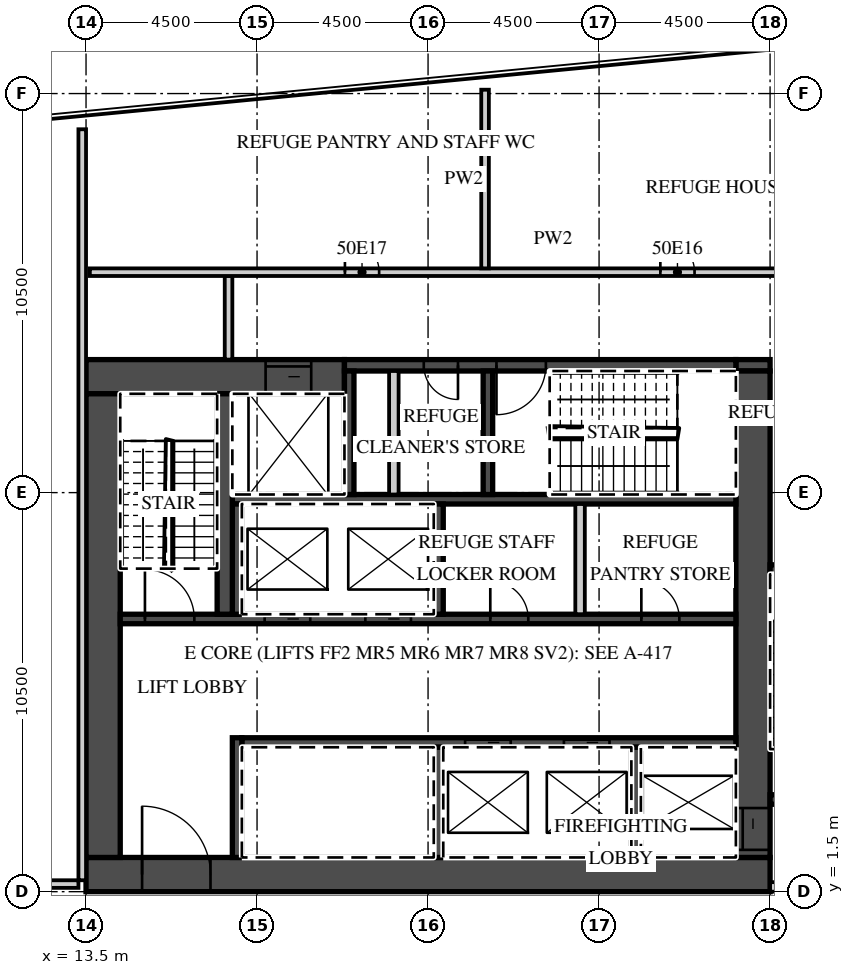
"""IFC4 building model, lengths in metres.
Left out: names, types, materials, properties, quantities, classifications, styles, units other than length and angle.
Written with IfcOpenShell. Run it as: python <this file> out.ifc"""

import sys

from ifc_helpers import new_model, si_unit, direction, frame, frame_2d, origin, place, context, subcontext, project, spatial, rectangle, extrude, element, fill, save


model = new_model("IFC4")
c1 = context("Model", 3, precision=1e-05, world=origin(), true_north=direction((0.0, 1.0)))
c2 = subcontext(c1, "Body", "Model", "MODEL_VIEW")
j1 = project(units=[si_unit("LENGTHUNIT", "METRE"), si_unit("PLANEANGLEUNIT", "RADIAN")], contexts=[c1])
p1 = place(None, origin())
s1 = spatial("IfcSite", under=j1, at=p1, CompositionType="ELEMENT")
p2 = place(p1, origin())
s2 = spatial("IfcBuilding", under=s1, at=p2, CompositionType="ELEMENT")
p3 = place(p2, frame((0.0, 0.0, 206.5)))
s3 = spatial("IfcBuildingStorey", under=s2, at=p3, CompositionType="ELEMENT", Elevation=206.5)
p4 = place(p3, frame((13.5, 1.95, 0.0), z_axis=(0.0, 0.0, 1.0), x_axis=(1.0, 0.0, 0.0)))
e1 = element("IfcWall", 1, at=p4, inside=s3, PredefinedType="SHEAR", context=c2, shape_type="SweptSolid", body=[
    extrude(rectangle(XDim=18.0, YDim=0.9, at=frame_2d((9.0, 0.0))), origin(), (0.0, 0.0, 1.0), 4.2),
])
p5 = place(p4, frame((1.475, 0.0, 0.0)))
e2 = element("IfcOpeningElement", 2, at=p5, cuts=e1, PredefinedType="OPENING", context=c2, shape_type="SweptSolid", body=[
    extrude(rectangle(XDim=1.8, YDim=2.1, at=frame_2d((0.9, 1.05))), frame((0.0, 0.46, 0.0), z_axis=(0.0, -1.0, 0.0), x_axis=(1.0, 0.0, 0.0)), (0.0, 0.0, 1.0), 0.92),
])
p6 = place(p3, frame((13.5, 15.05, 0.0), z_axis=(0.0, 0.0, 1.0), x_axis=(1.0, 0.0, 0.0)))
e3 = element("IfcWall", 3, at=p6, inside=s3, PredefinedType="SHEAR", context=c2, shape_type="SweptSolid", body=[
    extrude(rectangle(XDim=6.8, YDim=0.9, at=frame_2d((3.4, 0.0))), origin(), (0.0, 0.0, 1.0), 4.2),
])
p7 = place(p6, frame((4.725, 0.0, 0.0)))
e4 = element("IfcOpeningElement", 4, at=p7, cuts=e3, PredefinedType="OPENING", context=c2, shape_type="SweptSolid", body=[
    extrude(rectangle(XDim=1.2, YDim=2.1, at=frame_2d((0.6, 1.05))), frame((0.0, 0.46, 0.0), z_axis=(0.0, -1.0, 0.0), x_axis=(1.0, 0.0, 0.0)), (0.0, 0.0, 1.0), 0.92),
])
p8 = place(p3, frame((30.6, 15.35, 0.0), z_axis=(0.0, 0.0, 1.0), x_axis=(1.0, 0.0, 0.0)))
e5 = element("IfcWall", 5, at=p8, inside=s3, PredefinedType="SHEAR", context=c2, shape_type="SweptSolid", body=[
    extrude(rectangle(XDim=0.9, YDim=0.3, at=frame_2d((0.45, 0.0))), origin(), (0.0, 0.0, 1.0), 4.2),
])
p9 = place(p3, frame((20.3, 15.35, 0.0), z_axis=(0.0, 0.0, 1.0), x_axis=(1.0, 0.0, 0.0)))
e6 = element("IfcWall", 6, at=p9, inside=s3, PredefinedType="SHEAR", context=c2, shape_type="SweptSolid", body=[
    extrude(rectangle(XDim=10.3, YDim=0.3, at=frame_2d((5.15, 0.0))), origin(), (0.0, 0.0, 1.0), 4.2),
])
p10 = place(p9, frame((4.0, 0.0, 0.0)))
e7 = element("IfcOpeningElement", 7, at=p10, cuts=e6, PredefinedType="OPENING", context=c2, shape_type="SweptSolid", body=[
    extrude(rectangle(XDim=1.3, YDim=2.1, at=frame_2d((0.65, 1.05))), frame((0.0, 0.16, 0.0), z_axis=(0.0, -1.0, 0.0), x_axis=(1.0, 0.0, 0.0)), (0.0, 0.0, 1.0), 0.32),
])
p11 = place(p9, frame((2.087, 0.0, 0.0)))
e8 = element("IfcOpeningElement", 8, at=p11, cuts=e6, PredefinedType="OPENING", context=c2, shape_type="SweptSolid", body=[
    extrude(rectangle(XDim=0.9, YDim=2.1, at=frame_2d((0.45, 1.05))), frame((0.0, 0.16, 0.0), z_axis=(0.0, -1.0, 0.0), x_axis=(1.0, 0.0, 0.0)), (0.0, 0.0, 1.0), 0.32),
])
p12 = place(p3, frame((31.05, 2.4, 0.0), z_axis=(0.0, 0.0, 1.0), x_axis=(0.0, 1.0, 0.0)))
e9 = element("IfcWall", 9, at=p12, inside=s3, PredefinedType="SHEAR", context=c2, shape_type="SweptSolid", body=[
    extrude(rectangle(XDim=12.8, YDim=0.9, at=frame_2d((6.4, 0.0))), origin(), (0.0, 0.0, 1.0), 4.2),
])
p13 = place(p12, frame((0.2, 0.0, 0.0)))
e10 = element("IfcOpeningElement", 10, at=p13, cuts=e9, PredefinedType="OPENING", context=c2, shape_type="SweptSolid", body=[
    extrude(rectangle(XDim=1.1, YDim=2.1, at=frame_2d((0.55, 1.05))), frame((0.0, 0.46, 0.0), z_axis=(0.0, -1.0, 0.0), x_axis=(1.0, 0.0, 0.0)), (0.0, 0.0, 1.0), 0.92),
])
p14 = place(p3, frame((13.95, 2.4, 0.0), z_axis=(0.0, 0.0, 1.0), x_axis=(0.0, 1.0, 0.0)))
e11 = element("IfcWall", 11, at=p14, inside=s3, PredefinedType="SHEAR", context=c2, shape_type="SweptSolid", body=[
    extrude(rectangle(XDim=12.2, YDim=0.9, at=frame_2d((6.1, 0.0))), origin(), (0.0, 0.0, 1.0), 4.2),
])
p15 = place(p3, frame((17.6, 5.425, 0.0), z_axis=(0.0, 0.0, 1.0), x_axis=(1.0, 0.0, 0.0)))
e12 = element("IfcWall", 12, at=p15, inside=s3, PredefinedType="SHEAR", context=c2, shape_type="SweptSolid", body=[
    extrude(rectangle(XDim=13.0, YDim=0.25, at=frame_2d((6.5, 0.0))), origin(), (0.0, 0.0, 1.0), 4.2),
])
p16 = place(p15, frame((8.475, 0.0, 0.0)))
e13 = element("IfcOpeningElement", 13, at=p16, cuts=e12, PredefinedType="OPENING", context=c2, shape_type="SweptSolid", body=[
    extrude(rectangle(XDim=1.2, YDim=2.1, at=frame_2d((0.6, 1.05))), frame((0.0, 0.135, 0.0), z_axis=(0.0, -1.0, 0.0), x_axis=(1.0, 0.0, 0.0)), (0.0, 0.0, 1.0), 0.27),
])
p17 = place(p15, frame((5.875, 0.0, 0.0)))
e14 = element("IfcOpeningElement", 14, at=p17, cuts=e12, PredefinedType="OPENING", context=c2, shape_type="SweptSolid", body=[
    extrude(rectangle(XDim=1.2, YDim=2.1, at=frame_2d((0.6, 1.05))), frame((0.0, 0.135, 0.0), z_axis=(0.0, -1.0, 0.0), x_axis=(1.0, 0.0, 0.0)), (0.0, 0.0, 1.0), 0.27),
])
p18 = place(p3, frame((17.475, 2.4, 0.0), z_axis=(0.0, 0.0, 1.0), x_axis=(0.0, 1.0, 0.0)))
e15 = element("IfcWall", 15, at=p18, inside=s3, PredefinedType="SHEAR", context=c2, shape_type="SweptSolid", body=[
    extrude(rectangle(XDim=3.15, YDim=0.25, at=frame_2d((1.575, 0.0))), origin(), (0.0, 0.0, 1.0), 4.2),
])
for number, where, z_axis, x_axis in (
    (16, (27.975, 2.4, 0.0), (0.0, 0.0, 1.0), (0.0, 1.0, 0.0)),
    (17, (22.775, 2.4, 0.0), (0.0, 0.0, 1.0), (0.0, 1.0, 0.0)),
):
    element("IfcWall", number, at=place(p3, frame(where, z_axis=z_axis, x_axis=x_axis)), inside=s3, PredefinedType="SHEAR", context=c2, shape_type="SweptSolid", body=[
        extrude(rectangle(XDim=2.9, YDim=0.25, at=frame_2d((1.45, 0.0))), origin(), (0.0, 0.0, 1.0), 4.2),
    ])
p19 = place(p3, frame((14.4, 8.675, 0.0), z_axis=(0.0, 0.0, 1.0), x_axis=(1.0, 0.0, 0.0)))
e18 = element("IfcWall", 18, at=p19, inside=s3, PredefinedType="SHEAR", context=c2, shape_type="SweptSolid", body=[
    extrude(rectangle(XDim=16.2, YDim=0.25, at=frame_2d((8.1, 0.0))), origin(), (0.0, 0.0, 1.0), 4.2),
])
p20 = place(p19, frame((6.45, 0.0, 0.0)))
e19 = element("IfcOpeningElement", 19, at=p20, cuts=e18, PredefinedType="OPENING", context=c2, shape_type="SweptSolid", body=[
    extrude(rectangle(XDim=1.2, YDim=2.1, at=frame_2d((0.6, 1.05))), frame((0.0, 0.135, 0.0), z_axis=(0.0, -1.0, 0.0), x_axis=(1.0, 0.0, 0.0)), (0.0, 0.0, 1.0), 0.27),
])
p21 = place(p19, frame((3.8, 0.0, 0.0)))
e20 = element("IfcOpeningElement", 20, at=p21, cuts=e18, PredefinedType="OPENING", context=c2, shape_type="SweptSolid", body=[
    extrude(rectangle(XDim=1.2, YDim=2.1, at=frame_2d((0.6, 1.05))), frame((0.0, 0.135, 0.0), z_axis=(0.0, -1.0, 0.0), x_axis=(1.0, 0.0, 0.0)), (0.0, 0.0, 1.0), 0.27),
])
p22 = place(p19, frame((0.65, 0.0, 0.0)))
e21 = element("IfcOpeningElement", 21, at=p22, cuts=e18, PredefinedType="OPENING", context=c2, shape_type="SweptSolid", body=[
    extrude(rectangle(XDim=1.3, YDim=2.1, at=frame_2d((0.65, 1.05))), frame((0.0, 0.135, 0.0), z_axis=(0.0, -1.0, 0.0), x_axis=(1.0, 0.0, 0.0)), (0.0, 0.0, 1.0), 0.27),
])
p23 = place(p19, frame((13.712, 0.0, 0.0)))
e22 = element("IfcOpeningElement", 22, at=p23, cuts=e18, PredefinedType="OPENING", context=c2, shape_type="SweptSolid", body=[
    extrude(rectangle(XDim=1.0, YDim=2.1, at=frame_2d((0.5, 1.05))), frame((0.0, 0.135, 0.0), z_axis=(0.0, -1.0, 0.0), x_axis=(1.0, 0.0, 0.0)), (0.0, 0.0, 1.0), 0.27),
])
p24 = place(p19, frame((9.738, 0.0, 0.0)))
e23 = element("IfcOpeningElement", 23, at=p24, cuts=e18, PredefinedType="OPENING", context=c2, shape_type="SweptSolid", body=[
    extrude(rectangle(XDim=1.0, YDim=2.1, at=frame_2d((0.5, 1.05))), frame((0.0, 0.135, 0.0), z_axis=(0.0, -1.0, 0.0), x_axis=(1.0, 0.0, 0.0)), (0.0, 0.0, 1.0), 0.27),
])
p25 = place(p3, frame((17.35, 11.825, 0.0), z_axis=(0.0, 0.0, 1.0), x_axis=(1.0, 0.0, 0.0)))
e24 = element("IfcWall", 24, at=p25, inside=s3, PredefinedType="SHEAR", context=c2, shape_type="SweptSolid", body=[
    extrude(rectangle(XDim=13.25, YDim=0.25, at=frame_2d((6.625, 0.0))), origin(), (0.0, 0.0, 1.0), 4.2),
])
for number, where, z_axis, x_axis in (
    (25, (17.475, 8.8, 0.0), (0.0, 0.0, 1.0), (0.0, 1.0, 0.0)),
    (26, (22.775, 8.8, 0.0), (0.0, 0.0, 1.0), (0.0, 1.0, 0.0)),
):
    element("IfcWall", number, at=place(p3, frame(where, z_axis=z_axis, x_axis=x_axis)), inside=s3, PredefinedType="SHEAR", context=c2, shape_type="SweptSolid", body=[
        extrude(rectangle(XDim=2.9, YDim=0.25, at=frame_2d((1.45, 0.0))), origin(), (0.0, 0.0, 1.0), 4.2),
    ])
p26 = place(p3, frame((26.5, 8.8, 0.0), z_axis=(0.0, 0.0, 1.0), x_axis=(0.0, 1.0, 0.0)))
e27 = element("IfcWall", 27, at=p26, inside=s3, PredefinedType="PARTITIONING", context=c2, shape_type="SweptSolid", body=[
    extrude(rectangle(XDim=2.9, YDim=0.25, at=frame_2d((1.45, 0.0))), origin(), (0.0, 0.0, 1.0), 4.2),
])
p27 = place(p3, frame((17.15, 8.8, 0.0), z_axis=(0.0, 0.0, 1.0), x_axis=(0.0, 1.0, 0.0)))
e28 = element("IfcWall", 28, at=p27, inside=s3, PredefinedType="SHEAR", context=c2, shape_type="SweptSolid", body=[
    extrude(rectangle(XDim=5.8, YDim=0.4, at=frame_2d((2.9, 0.0))), origin(), (0.0, 0.0, 1.0), 4.2),
])
for number, where, z_axis, x_axis in (
    (29, (20.425, 11.95, 0.0), (0.0, 0.0, 1.0), (0.0, 1.0, 0.0)),
    (30, (24.075, 11.95, 0.0), (0.0, 0.0, 1.0), (0.0, 1.0, 0.0)),
):
    element("IfcWall", number, at=place(p3, frame(where, z_axis=z_axis, x_axis=x_axis)), inside=s3, PredefinedType="SHEAR", context=c2, shape_type="SweptSolid", body=[
        extrude(rectangle(XDim=3.25, YDim=0.25, at=frame_2d((1.625, 0.0))), origin(), (0.0, 0.0, 1.0), 4.2),
    ])
p28 = place(p3, frame((21.6, 11.95, 0.0), z_axis=(0.0, 0.0, 1.0), x_axis=(0.0, 1.0, 0.0)))
e31 = element("IfcWall", 31, at=p28, inside=s3, PredefinedType="PARTITIONING", context=c2, shape_type="SweptSolid", body=[
    extrude(rectangle(XDim=3.25, YDim=0.25, at=frame_2d((1.625, 0.0))), origin(), (0.0, 0.0, 1.0), 4.2),
])
p29 = place(p3, frame((31.5, 1.625, 0.0), z_axis=(0.0, 0.0, 1.0), x_axis=(1.0, 0.0, 0.0)))
e32 = element("IfcWall", 32, at=p29, inside=s3, PredefinedType="PARTITIONING", context=c2, shape_type="SweptSolid", body=[
    extrude(rectangle(XDim=8.035, YDim=0.25, at=frame_2d((4.018, 0.0))), origin(), (0.0, 0.0, 1.0), 4.2),
])
p30 = place(p29, frame((0.625, 0.0, 0.0)))
e33 = element("IfcOpeningElement", 33, at=p30, cuts=e32, PredefinedType="OPENING", context=c2, shape_type="SweptSolid", body=[
    extrude(rectangle(XDim=1.3, YDim=2.1, at=frame_2d((0.65, 1.05))), frame((0.0, 0.135, 0.0), z_axis=(0.0, -1.0, 0.0), x_axis=(1.0, 0.0, 0.0)), (0.0, 0.0, 1.0), 0.27),
])
p31 = place(p29, frame((3.05, 0.0, 0.0)))
e34 = element("IfcOpeningElement", 34, at=p31, cuts=e32, PredefinedType="OPENING", context=c2, shape_type="SweptSolid", body=[
    extrude(rectangle(XDim=1.1, YDim=2.1, at=frame_2d((0.55, 1.05))), frame((0.0, 0.135, 0.0), z_axis=(0.0, -1.0, 0.0), x_axis=(1.0, 0.0, 0.0)), (0.0, 0.0, 1.0), 0.27),
])
p32 = place(p3, frame((31.5, 3.925, 0.0), z_axis=(0.0, 0.0, 1.0), x_axis=(1.0, 0.0, 0.0)))
e35 = element("IfcWall", 35, at=p32, inside=s3, PredefinedType="SHEAR", context=c2, shape_type="SweptSolid", body=[
    extrude(rectangle(XDim=2.55, YDim=0.25, at=frame_2d((1.275, 0.0))), origin(), (0.0, 0.0, 1.0), 4.2),
])
p33 = place(p32, frame((0.625, 0.0, 0.0)))
e36 = element("IfcOpeningElement", 36, at=p33, cuts=e35, PredefinedType="OPENING", context=c2, shape_type="SweptSolid", body=[
    extrude(rectangle(XDim=1.3, YDim=2.1, at=frame_2d((0.65, 1.05))), frame((0.0, 0.135, 0.0), z_axis=(0.0, -1.0, 0.0), x_axis=(1.0, 0.0, 0.0)), (0.0, 0.0, 1.0), 0.27),
])
p34 = place(p3, frame((31.5, 9.975, 0.0), z_axis=(0.0, 0.0, 1.0), x_axis=(1.0, 0.0, 0.0)))
e37 = element("IfcWall", 37, at=p34, inside=s3, PredefinedType="SHEAR", context=c2, shape_type="SweptSolid", body=[
    extrude(rectangle(XDim=2.55, YDim=0.25, at=frame_2d((1.275, 0.0))), origin(), (0.0, 0.0, 1.0), 4.2),
])
p35 = place(p3, frame((17.25, 15.5, 0.0), z_axis=(0.0, 0.0, 1.0), x_axis=(0.0, 1.0, 0.0)))
e38 = element("IfcWall", 38, at=p35, inside=s3, PredefinedType="PARTITIONING", context=c2, shape_type="SweptSolid", body=[
    extrude(rectangle(XDim=2.2, YDim=0.2, at=frame_2d((1.1, 0.0))), origin(), (0.0, 0.0, 1.0), 4.2),
])
p36 = place(p3, frame((13.6, 17.8, 0.0), z_axis=(0.0, 0.0, 1.0), x_axis=(1.0, 0.0, 0.0)))
e39 = element("IfcWall", 39, at=p36, inside=s3, PredefinedType="PARTITIONING", context=c2, shape_type="SweptSolid", body=[
    extrude(rectangle(XDim=24.378, YDim=0.2, at=frame_2d((12.189, 0.0))), origin(), (0.0, 0.0, 1.0), 4.2),
])
p37 = place(p36, frame((15.012, 0.0, 0.0)))
e40 = element("IfcOpeningElement", 40, at=p37, cuts=e39, PredefinedType="OPENING", context=c2, shape_type="SweptSolid", body=[
    extrude(rectangle(XDim=0.9, YDim=2.1, at=frame_2d((0.45, 1.05))), frame((0.0, 0.11, 0.0), z_axis=(0.0, -1.0, 0.0), x_axis=(1.0, 0.0, 0.0)), (0.0, 0.0, 1.0), 0.22),
])
p38 = place(p36, frame((6.712, 0.0, 0.0)))
e41 = element("IfcOpeningElement", 41, at=p38, cuts=e39, PredefinedType="OPENING", context=c2, shape_type="SweptSolid", body=[
    extrude(rectangle(XDim=0.9, YDim=2.1, at=frame_2d((0.45, 1.05))), frame((0.0, 0.11, 0.0), z_axis=(0.0, -1.0, 0.0), x_axis=(1.0, 0.0, 0.0)), (0.0, 0.0, 1.0), 0.22),
])
p39 = place(p3, frame((24.0, 17.9, 0.0), z_axis=(0.0, 0.0, 1.0), x_axis=(0.0, 1.0, 0.0)))
e42 = element("IfcWall", 42, at=p39, inside=s3, PredefinedType="PARTITIONING", context=c2, shape_type="SweptSolid", body=[
    extrude(rectangle(XDim=4.701, YDim=0.2, at=frame_2d((2.351, 0.0))), origin(), (0.0, 0.0, 1.0), 4.2),
])
p40 = place(p3, frame((-42.942, 1.7, 0.0), z_axis=(0.0, 0.0, 1.0), x_axis=(1.0, 0.0, 0.0)))
e43 = element("IfcWall", 43, at=p40, inside=s3, PredefinedType="PARTITIONING", context=c2, shape_type="SweptSolid", body=[
    extrude(rectangle(XDim=56.242, YDim=0.2, at=frame_2d((28.121, 0.0))), origin(), (0.0, 0.0, 1.0), 4.2),
])
p41 = place(p40, frame((50.592, 0.0, 0.0)))
e44 = element("IfcOpeningElement", 44, at=p41, cuts=e43, PredefinedType="OPENING", context=c2, shape_type="SweptSolid", body=[
    extrude(rectangle(XDim=1.0, YDim=2.1, at=frame_2d((0.5, 1.05))), frame((0.0, 0.11, 0.0), z_axis=(0.0, -1.0, 0.0), x_axis=(1.0, 0.0, 0.0)), (0.0, 0.0, 1.0), 0.22),
])
p42 = place(p40, frame((40.802, 0.0, 0.0)))
e45 = element("IfcOpeningElement", 45, at=p42, cuts=e43, PredefinedType="OPENING", context=c2, shape_type="SweptSolid", body=[
    extrude(rectangle(XDim=1.8, YDim=2.1, at=frame_2d((0.9, 1.05))), frame((0.0, 0.11, 0.0), z_axis=(0.0, -1.0, 0.0), x_axis=(1.0, 0.0, 0.0)), (0.0, 0.0, 1.0), 0.22),
])
p43 = place(p40, frame((34.282, 0.0, 0.0)))
e46 = element("IfcOpeningElement", 46, at=p43, cuts=e43, PredefinedType="OPENING", context=c2, shape_type="SweptSolid", body=[
    extrude(rectangle(XDim=1.8, YDim=2.1, at=frame_2d((0.9, 1.05))), frame((0.0, 0.11, 0.0), z_axis=(0.0, -1.0, 0.0), x_axis=(1.0, 0.0, 0.0)), (0.0, 0.0, 1.0), 0.22),
])
p44 = place(p40, frame((26.917, 0.0, 0.0)))
e47 = element("IfcOpeningElement", 47, at=p44, cuts=e43, PredefinedType="OPENING", context=c2, shape_type="SweptSolid", body=[
    extrude(rectangle(XDim=1.2, YDim=2.1, at=frame_2d((0.6, 1.05))), frame((0.0, 0.11, 0.0), z_axis=(0.0, -1.0, 0.0), x_axis=(1.0, 0.0, 0.0)), (0.0, 0.0, 1.0), 0.22),
])
p45 = place(p40, frame((16.242, 0.0, 0.0)))
e48 = element("IfcOpeningElement", 48, at=p45, cuts=e43, PredefinedType="OPENING", context=c2, shape_type="SweptSolid", body=[
    extrude(rectangle(XDim=1.8, YDim=2.1, at=frame_2d((0.9, 1.05))), frame((0.0, 0.11, 0.0), z_axis=(0.0, -1.0, 0.0), x_axis=(1.0, 0.0, 0.0)), (0.0, 0.0, 1.0), 0.22),
])
p46 = place(p40, frame((5.007, 0.0, 0.0)))
e49 = element("IfcOpeningElement", 49, at=p46, cuts=e43, PredefinedType="OPENING", context=c2, shape_type="SweptSolid", body=[
    extrude(rectangle(XDim=1.0, YDim=2.1, at=frame_2d((0.5, 1.05))), frame((0.0, 0.11, 0.0), z_axis=(0.0, -1.0, 0.0), x_axis=(1.0, 0.0, 0.0)), (0.0, 0.0, 1.0), 0.22),
])
p47 = place(p3, frame((13.4, 1.8, 0.0), z_axis=(0.0, 0.0, 1.0), x_axis=(0.0, 1.0, 0.0)))
e50 = element("IfcWall", 50, at=p47, inside=s3, PredefinedType="PARTITIONING", context=c2, shape_type="SweptSolid", body=[
    extrude(rectangle(XDim=19.76, YDim=0.2, at=frame_2d((9.88, 0.0))), origin(), (0.0, 0.0, 1.0), 4.2),
])
p48 = place(p20, origin())
e51 = element("IfcDoor", 51, at=p48, inside=s3, OperationType="SLIDING_TO_LEFT", PredefinedType="DOOR", context=c2, shape_type="SweptSolid", body=[
    extrude(rectangle(XDim=1.2, YDim=2.1, at=frame_2d((0.6, 1.05))), frame((0.0, 0.025, 0.0), z_axis=(0.0, -1.0, 0.0), x_axis=(1.0, 0.0, 0.0)), (0.0, 0.0, 1.0), 0.05),
])
fill(e19, e51)
p49 = place(p21, origin())
e52 = element("IfcDoor", 52, at=p49, inside=s3, OperationType="SLIDING_TO_RIGHT", PredefinedType="DOOR", context=c2, shape_type="SweptSolid", body=[
    extrude(rectangle(XDim=1.2, YDim=2.1, at=frame_2d((0.6, 1.05))), frame((0.0, 0.025, 0.0), z_axis=(0.0, -1.0, 0.0), x_axis=(1.0, 0.0, 0.0)), (0.0, 0.0, 1.0), 0.05),
])
fill(e20, e52)
p50 = place(p16, origin())
e53 = element("IfcDoor", 53, at=p50, inside=s3, OperationType="SLIDING_TO_LEFT", PredefinedType="DOOR", context=c2, shape_type="SweptSolid", body=[
    extrude(rectangle(XDim=1.2, YDim=2.1, at=frame_2d((0.6, 1.05))), frame((0.0, 0.025, 0.0), z_axis=(0.0, -1.0, 0.0), x_axis=(1.0, 0.0, 0.0)), (0.0, 0.0, 1.0), 0.05),
])
fill(e13, e53)
p51 = place(p17, origin())
e54 = element("IfcDoor", 54, at=p51, inside=s3, OperationType="SLIDING_TO_RIGHT", PredefinedType="DOOR", context=c2, shape_type="SweptSolid", body=[
    extrude(rectangle(XDim=1.2, YDim=2.1, at=frame_2d((0.6, 1.05))), frame((0.0, 0.025, 0.0), z_axis=(0.0, -1.0, 0.0), x_axis=(1.0, 0.0, 0.0)), (0.0, 0.0, 1.0), 0.05),
])
fill(e14, e54)
p52 = place(p7, origin())
e55 = element("IfcDoor", 55, at=p52, inside=s3, OperationType="SLIDING_TO_LEFT", PredefinedType="DOOR", context=c2, shape_type="SweptSolid", body=[
    extrude(rectangle(XDim=1.2, YDim=2.1, at=frame_2d((0.6, 1.05))), frame((0.0, 0.025, 0.0), z_axis=(0.0, -1.0, 0.0), x_axis=(1.0, 0.0, 0.0)), (0.0, 0.0, 1.0), 0.05),
])
fill(e4, e55)
p53 = place(p13, origin())
e56 = element("IfcDoor", 56, at=p53, inside=s3, OperationType="SLIDING_TO_LEFT", PredefinedType="DOOR", context=c2, shape_type="SweptSolid", body=[
    extrude(rectangle(XDim=1.1, YDim=2.1, at=frame_2d((0.55, 1.05))), frame((0.0, 0.025, 0.0), z_axis=(0.0, -1.0, 0.0), x_axis=(1.0, 0.0, 0.0)), (0.0, 0.0, 1.0), 0.05),
])
fill(e10, e56)
p54 = place(p5, origin())
e57 = element("IfcDoor", 57, at=p54, inside=s3, OperationType="DOUBLE_DOOR_DOUBLE_SWING", PredefinedType="DOOR", context=c2, shape_type="SweptSolid", body=[
    extrude(rectangle(XDim=1.8, YDim=2.1, at=frame_2d((0.9, 1.05))), frame((0.0, 0.025, 0.0), z_axis=(0.0, -1.0, 0.0), x_axis=(1.0, 0.0, 0.0)), (0.0, 0.0, 1.0), 0.05),
])
fill(e2, e57)
p55 = place(p22, origin())
e58 = element("IfcDoor", 58, at=p55, inside=s3, OperationType="SINGLE_SWING_LEFT", PredefinedType="DOOR", context=c2, shape_type="SweptSolid", body=[
    extrude(rectangle(XDim=1.3, YDim=2.1, at=frame_2d((0.65, 1.05))), frame((0.0, 0.025, 0.0), z_axis=(0.0, -1.0, 0.0), x_axis=(1.0, 0.0, 0.0)), (0.0, 0.0, 1.0), 0.05),
])
fill(e21, e58)
p56 = place(p10, origin())
e59 = element("IfcDoor", 59, at=p56, inside=s3, OperationType="SINGLE_SWING_LEFT", PredefinedType="DOOR", context=c2, shape_type="SweptSolid", body=[
    extrude(rectangle(XDim=1.3, YDim=2.1, at=frame_2d((0.65, 1.05))), frame((0.0, 0.025, 0.0), z_axis=(0.0, -1.0, 0.0), x_axis=(1.0, 0.0, 0.0)), (0.0, 0.0, 1.0), 0.05),
])
fill(e7, e59)
p57 = place(p11, origin())
e60 = element("IfcDoor", 60, at=p57, inside=s3, OperationType="SINGLE_SWING_RIGHT", PredefinedType="DOOR", context=c2, shape_type="SweptSolid", body=[
    extrude(rectangle(XDim=0.9, YDim=2.1, at=frame_2d((0.45, 1.05))), frame((0.0, 0.025, 0.0), z_axis=(0.0, -1.0, 0.0), x_axis=(1.0, 0.0, 0.0)), (0.0, 0.0, 1.0), 0.05),
])
fill(e8, e60)
p58 = place(p23, origin())
e61 = element("IfcDoor", 61, at=p58, inside=s3, OperationType="SINGLE_SWING_LEFT", PredefinedType="DOOR", context=c2, shape_type="SweptSolid", body=[
    extrude(rectangle(XDim=1.0, YDim=2.1, at=frame_2d((0.5, 1.05))), frame((0.0, 0.025, 0.0), z_axis=(0.0, -1.0, 0.0), x_axis=(1.0, 0.0, 0.0)), (0.0, 0.0, 1.0), 0.05),
])
fill(e22, e61)
p59 = place(p24, origin())
e62 = element("IfcDoor", 62, at=p59, inside=s3, OperationType="SINGLE_SWING_LEFT", PredefinedType="DOOR", context=c2, shape_type="SweptSolid", body=[
    extrude(rectangle(XDim=1.0, YDim=2.1, at=frame_2d((0.5, 1.05))), frame((0.0, 0.025, 0.0), z_axis=(0.0, -1.0, 0.0), x_axis=(1.0, 0.0, 0.0)), (0.0, 0.0, 1.0), 0.05),
])
fill(e23, e62)
p60 = place(p37, origin())
e63 = element("IfcDoor", 63, at=p60, inside=s3, OperationType="SINGLE_SWING_LEFT", PredefinedType="DOOR", context=c2, shape_type="SweptSolid", body=[
    extrude(rectangle(XDim=0.9, YDim=2.1, at=frame_2d((0.45, 1.05))), frame((0.0, 0.025, 0.0), z_axis=(0.0, -1.0, 0.0), x_axis=(1.0, 0.0, 0.0)), (0.0, 0.0, 1.0), 0.05),
])
fill(e40, e63)
p61 = place(p38, origin())
e64 = element("IfcDoor", 64, at=p61, inside=s3, OperationType="SINGLE_SWING_LEFT", PredefinedType="DOOR", context=c2, shape_type="SweptSolid", body=[
    extrude(rectangle(XDim=0.9, YDim=2.1, at=frame_2d((0.45, 1.05))), frame((0.0, 0.025, 0.0), z_axis=(0.0, -1.0, 0.0), x_axis=(1.0, 0.0, 0.0)), (0.0, 0.0, 1.0), 0.05),
])
fill(e41, e64)
save(model, sys.argv[1])
